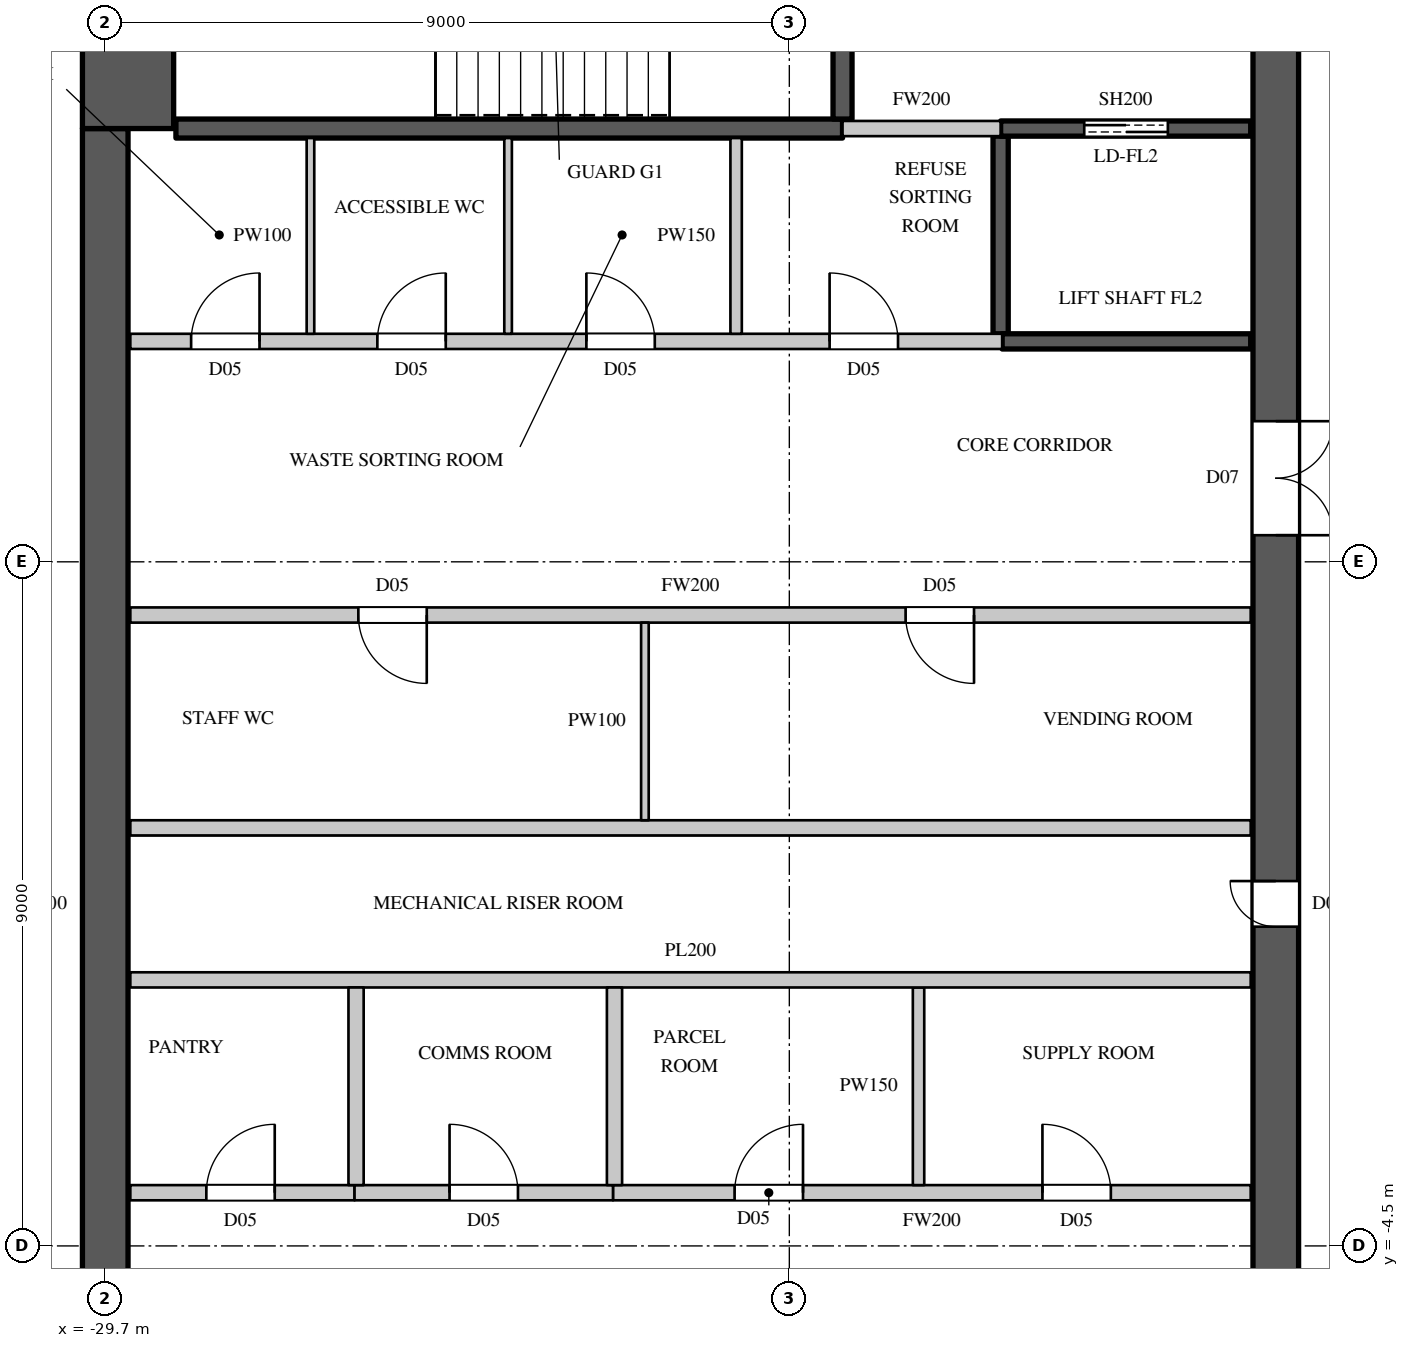
"""IFC4 building model, lengths in metres.
Left out: names, types, materials, properties, quantities, classifications, styles, units other than length and angle.
Written with IfcOpenShell. Run it as: python <this file> out.ifc"""

import sys

from ifc_helpers import new_model, si_unit, direction, frame, frame_2d, origin, place, context, subcontext, project, spatial, rectangle, extrude, element, fill, save


model = new_model("IFC4")
c1 = context("Model", 3, precision=1e-05, world=origin(), true_north=direction((0.0, 1.0)))
c2 = subcontext(c1, "Body", "Model", "MODEL_VIEW")
j1 = project(units=[si_unit("LENGTHUNIT", "METRE"), si_unit("PLANEANGLEUNIT", "RADIAN")], contexts=[c1])
p1 = place(None, origin())
s1 = spatial("IfcSite", under=j1, at=p1, CompositionType="ELEMENT")
p2 = place(p1, origin())
s2 = spatial("IfcBuilding", under=s1, at=p2, CompositionType="ELEMENT")
p3 = place(p2, frame((0.0, 0.0, 343.0)))
s3 = spatial("IfcBuildingStorey", under=s2, at=p3, CompositionType="ELEMENT", Elevation=343.0)
p4 = place(p3, frame((-14.3, -14.8, 0.0), z_axis=(0.0, 0.0, 1.0), x_axis=(0.0, 1.0, 0.0)))
e1 = element("IfcWall", 1, at=p4, inside=s3, PredefinedType="SHEAR", context=c2, shape_type="SweptSolid", body=[
    extrude(rectangle(XDim=29.6, YDim=0.6, at=frame_2d((14.8, 0.0))), origin(), (0.0, 0.0, 1.0), 4.0),
])
p5 = place(p4, frame((1.55, 0.0, 0.0)))
e2 = element("IfcOpeningElement", 2, at=p5, cuts=e1, PredefinedType="OPENING", context=c2, shape_type="SweptSolid", body=[
    extrude(rectangle(XDim=1.5, YDim=2.4, at=frame_2d((0.75, 1.2))), frame((0.0, 0.31, 0.0), z_axis=(0.0, -1.0, 0.0), x_axis=(1.0, 0.0, 0.0)), (0.0, 0.0, 1.0), 0.62),
])
p6 = place(p4, frame((26.55, 0.0, 0.0)))
e3 = element("IfcOpeningElement", 3, at=p6, cuts=e1, PredefinedType="OPENING", context=c2, shape_type="SweptSolid", body=[
    extrude(rectangle(XDim=1.5, YDim=2.4, at=frame_2d((0.75, 1.2))), frame((0.0, 0.31, 0.0), z_axis=(0.0, -1.0, 0.0), x_axis=(1.0, 0.0, 0.0)), (0.0, 0.0, 1.0), 0.62),
])
p7 = place(p4, frame((8.45, 0.0, 0.0)))
e4 = element("IfcOpeningElement", 4, at=p7, cuts=e1, PredefinedType="OPENING", context=c2, shape_type="SweptSolid", body=[
    extrude(rectangle(XDim=1.5, YDim=2.4, at=frame_2d((0.75, 1.2))), frame((0.0, 0.31, 0.0), z_axis=(0.0, -1.0, 0.0), x_axis=(1.0, 0.0, 0.0)), (0.0, 0.0, 1.0), 0.62),
])
p8 = place(p4, frame((19.65, 0.0, 0.0)))
e5 = element("IfcOpeningElement", 5, at=p8, cuts=e1, PredefinedType="OPENING", context=c2, shape_type="SweptSolid", body=[
    extrude(rectangle(XDim=1.5, YDim=2.4, at=frame_2d((0.75, 1.2))), frame((0.0, 0.31, 0.0), z_axis=(0.0, -1.0, 0.0), x_axis=(1.0, 0.0, 0.0)), (0.0, 0.0, 1.0), 0.62),
])
p9 = place(p4, frame((14.5, 0.0, 0.0)))
e6 = element("IfcOpeningElement", 6, at=p9, cuts=e1, PredefinedType="OPENING", context=c2, shape_type="SweptSolid", body=[
    extrude(rectangle(XDim=0.6, YDim=2.0, at=frame_2d((0.3, 1.0))), frame((0.0, 0.31, 0.0), z_axis=(0.0, -1.0, 0.0), x_axis=(1.0, 0.0, 0.0)), (0.0, 0.0, 1.0), 0.62),
])
p10 = place(p3, frame((-29.7, -10.2, 0.0), z_axis=(0.0, 0.0, 1.0), x_axis=(0.0, 1.0, 0.0)))
e7 = element("IfcWall", 7, at=p10, inside=s3, PredefinedType="SHEAR", context=c2, shape_type="SweptSolid", body=[
    extrude(rectangle(XDim=20.4, YDim=0.6, at=frame_2d((10.2, 0.0))), origin(), (0.0, 0.0, 1.0), 4.0),
])
p11 = place(p3, frame((-29.4, 10.2, 0.0), z_axis=(0.0, 0.0, 1.0), x_axis=(0.0, 1.0, 0.0)))
e8 = element("IfcWall", 8, at=p11, inside=s3, PredefinedType="SHEAR", context=c2, shape_type="SweptSolid", body=[
    extrude(rectangle(XDim=4.6, YDim=1.2, at=frame_2d((2.3, 0.0))), origin(), (0.0, 0.0, 1.0), 4.0),
])
p12 = place(p3, frame((-29.37, -3.8, 0.0), z_axis=(0.0, 0.0, 1.0), x_axis=(1.0, 0.0, 0.0)))
e9 = element("IfcWall", 9, at=p12, inside=s3, PredefinedType="PARTITIONING", context=c2, shape_type="SweptSolid", body=[
    extrude(rectangle(XDim=2.95, YDim=0.2, at=frame_2d((1.475, 0.0))), origin(), (0.0, 0.0, 1.0), 3.598),
])
p13 = place(p12, frame((1.0, 0.0, 0.0)))
e10 = element("IfcOpeningElement", 10, at=p13, cuts=e9, PredefinedType="OPENING", context=c2, shape_type="SweptSolid", body=[
    extrude(rectangle(XDim=0.9, YDim=2.2, at=frame_2d((0.45, 1.1))), frame((0.0, 0.11, 0.0), z_axis=(0.0, -1.0, 0.0), x_axis=(1.0, 0.0, 0.0)), (0.0, 0.0, 1.0), 0.22),
])
p14 = place(p3, frame((-29.37, 3.8, 0.0), z_axis=(0.0, 0.0, 1.0), x_axis=(1.0, 0.0, 0.0)))
e11 = element("IfcWall", 11, at=p14, inside=s3, PredefinedType="PARTITIONING", context=c2, shape_type="SweptSolid", body=[
    extrude(rectangle(XDim=14.74, YDim=0.2, at=frame_2d((7.37, 0.0))), origin(), (0.0, 0.0, 1.0), 3.598),
])
p15 = place(p14, frame((3.0, 0.0, 0.0)))
e12 = element("IfcOpeningElement", 12, at=p15, cuts=e11, PredefinedType="OPENING", context=c2, shape_type="SweptSolid", body=[
    extrude(rectangle(XDim=0.9, YDim=2.2, at=frame_2d((0.45, 1.1))), frame((0.0, 0.11, 0.0), z_axis=(0.0, -1.0, 0.0), x_axis=(1.0, 0.0, 0.0)), (0.0, 0.0, 1.0), 0.22),
])
p16 = place(p14, frame((10.2, 0.0, 0.0)))
e13 = element("IfcOpeningElement", 13, at=p16, cuts=e11, PredefinedType="OPENING", context=c2, shape_type="SweptSolid", body=[
    extrude(rectangle(XDim=0.9, YDim=2.2, at=frame_2d((0.45, 1.1))), frame((0.0, 0.11, 0.0), z_axis=(0.0, -1.0, 0.0), x_axis=(1.0, 0.0, 0.0)), (0.0, 0.0, 1.0), 0.22),
])
p17 = place(p3, frame((-29.37, 7.4, 0.0), z_axis=(0.0, 0.0, 1.0), x_axis=(1.0, 0.0, 0.0)))
e14 = element("IfcWall", 14, at=p17, inside=s3, PredefinedType="PARTITIONING", context=c2, shape_type="SweptSolid", body=[
    extrude(rectangle(XDim=11.47, YDim=0.2, at=frame_2d((5.735, 0.0))), origin(), (0.0, 0.0, 1.0), 3.598),
])
p18 = place(p17, frame((0.8, 0.0, 0.0)))
e15 = element("IfcOpeningElement", 15, at=p18, cuts=e14, PredefinedType="OPENING", context=c2, shape_type="SweptSolid", body=[
    extrude(rectangle(XDim=0.9, YDim=2.2, at=frame_2d((0.45, 1.1))), frame((0.0, 0.11, 0.0), z_axis=(0.0, -1.0, 0.0), x_axis=(1.0, 0.0, 0.0)), (0.0, 0.0, 1.0), 0.22),
])
p19 = place(p17, frame((3.25, 0.0, 0.0)))
e16 = element("IfcOpeningElement", 16, at=p19, cuts=e14, PredefinedType="OPENING", context=c2, shape_type="SweptSolid", body=[
    extrude(rectangle(XDim=0.9, YDim=2.2, at=frame_2d((0.45, 1.1))), frame((0.0, 0.11, 0.0), z_axis=(0.0, -1.0, 0.0), x_axis=(1.0, 0.0, 0.0)), (0.0, 0.0, 1.0), 0.22),
])
p20 = place(p17, frame((6.0, 0.0, 0.0)))
e17 = element("IfcOpeningElement", 17, at=p20, cuts=e14, PredefinedType="OPENING", context=c2, shape_type="SweptSolid", body=[
    extrude(rectangle(XDim=0.9, YDim=2.2, at=frame_2d((0.45, 1.1))), frame((0.0, 0.11, 0.0), z_axis=(0.0, -1.0, 0.0), x_axis=(1.0, 0.0, 0.0)), (0.0, 0.0, 1.0), 0.22),
])
p21 = place(p17, frame((9.2, 0.0, 0.0)))
e18 = element("IfcOpeningElement", 18, at=p21, cuts=e14, PredefinedType="OPENING", context=c2, shape_type="SweptSolid", body=[
    extrude(rectangle(XDim=0.9, YDim=2.2, at=frame_2d((0.45, 1.1))), frame((0.0, 0.11, 0.0), z_axis=(0.0, -1.0, 0.0), x_axis=(1.0, 0.0, 0.0)), (0.0, 0.0, 1.0), 0.22),
])
p22 = place(p3, frame((-23.02, -3.8, 0.0), z_axis=(0.0, 0.0, 1.0), x_axis=(1.0, 0.0, 0.0)))
e19 = element("IfcWall", 19, at=p22, inside=s3, PredefinedType="PARTITIONING", context=c2, shape_type="SweptSolid", body=[
    extrude(rectangle(XDim=8.39, YDim=0.2, at=frame_2d((4.195, 0.0))), origin(), (0.0, 0.0, 1.0), 3.598),
])
p23 = place(p22, frame((1.6, 0.0, 0.0)))
e20 = element("IfcOpeningElement", 20, at=p23, cuts=e19, PredefinedType="OPENING", context=c2, shape_type="SweptSolid", body=[
    extrude(rectangle(XDim=0.9, YDim=2.2, at=frame_2d((0.45, 1.1))), frame((0.0, 0.11, 0.0), z_axis=(0.0, -1.0, 0.0), x_axis=(1.0, 0.0, 0.0)), (0.0, 0.0, 1.0), 0.22),
])
p24 = place(p22, frame((5.65, 0.0, 0.0)))
e21 = element("IfcOpeningElement", 21, at=p24, cuts=e19, PredefinedType="OPENING", context=c2, shape_type="SweptSolid", body=[
    extrude(rectangle(XDim=0.9, YDim=2.2, at=frame_2d((0.45, 1.1))), frame((0.0, 0.11, 0.0), z_axis=(0.0, -1.0, 0.0), x_axis=(1.0, 0.0, 0.0)), (0.0, 0.0, 1.0), 0.22),
])
p25 = place(p3, frame((-20.0, 10.2, 0.0), z_axis=(0.0, 0.0, 1.0), x_axis=(1.0, 0.0, 0.0)))
e22 = element("IfcWall", 22, at=p25, inside=s3, PredefinedType="PARTITIONING", context=c2, shape_type="SweptSolid", body=[
    extrude(rectangle(XDim=2.08, YDim=0.2, at=frame_2d((1.04, 0.0))), origin(), (0.0, 0.0, 1.0), 3.598),
])
p26 = place(p3, frame((-21.4, 7.5, 0.0), z_axis=(0.0, 0.0, 1.0), x_axis=(0.0, 1.0, 0.0)))
e23 = element("IfcWall", 23, at=p26, inside=s3, PredefinedType="PARTITIONING", context=c2, shape_type="SweptSolid", body=[
    extrude(rectangle(XDim=2.575, YDim=0.15, at=frame_2d((1.288, 0.0))), origin(), (0.0, 0.0, 1.0), 3.598),
])
p27 = place(p3, frame((-19.0, -3.7, 0.0), z_axis=(0.0, 0.0, 1.0), x_axis=(0.0, 1.0, 0.0)))
e24 = element("IfcWall", 24, at=p27, inside=s3, PredefinedType="PARTITIONING", context=c2, shape_type="SweptSolid", body=[
    extrude(rectangle(XDim=2.6, YDim=0.15, at=frame_2d((1.3, 0.0))), origin(), (0.0, 0.0, 1.0), 3.598),
])
for number, where, z_axis, x_axis in (
    (25, (-29.37, -1.0, 0.0), (0.0, 0.0, 1.0), (1.0, 0.0, 0.0)),
    (26, (-29.37, 1.0, 0.0), (0.0, 0.0, 1.0), (1.0, 0.0, 0.0)),
):
    element("IfcWall", number, at=place(p3, frame(where, z_axis=z_axis, x_axis=x_axis)), inside=s3, PredefinedType="PARTITIONING", context=c2, shape_type="SweptSolid", body=[
        extrude(rectangle(XDim=14.74, YDim=0.2, at=frame_2d((7.37, 0.0))), origin(), (0.0, 0.0, 1.0), 3.598),
    ])
p28 = place(p3, frame((-26.42, -3.8, 0.0), z_axis=(0.0, 0.0, 1.0), x_axis=(1.0, 0.0, 0.0)))
e27 = element("IfcWall", 27, at=p28, inside=s3, PredefinedType="PARTITIONING", context=c2, shape_type="SweptSolid", body=[
    extrude(rectangle(XDim=3.4, YDim=0.2, at=frame_2d((1.7, 0.0))), origin(), (0.0, 0.0, 1.0), 3.598),
])
p29 = place(p28, frame((1.25, 0.0, 0.0)))
e28 = element("IfcOpeningElement", 28, at=p29, cuts=e27, PredefinedType="OPENING", context=c2, shape_type="SweptSolid", body=[
    extrude(rectangle(XDim=0.9, YDim=2.2, at=frame_2d((0.45, 1.1))), frame((0.0, 0.11, 0.0), z_axis=(0.0, -1.0, 0.0), x_axis=(1.0, 0.0, 0.0)), (0.0, 0.0, 1.0), 0.22),
])
for number, where, z_axis, x_axis in (
    (29, (-26.4, -3.7, 0.0), (0.0, 0.0, 1.0), (0.0, 1.0, 0.0)),
    (30, (-23.0, -3.7, 0.0), (0.0, 0.0, 1.0), (0.0, 1.0, 0.0)),
):
    element("IfcWall", number, at=place(p3, frame(where, z_axis=z_axis, x_axis=x_axis)), inside=s3, PredefinedType="PARTITIONING", context=c2, shape_type="SweptSolid", body=[
        extrude(rectangle(XDim=2.6, YDim=0.2, at=frame_2d((1.3, 0.0))), origin(), (0.0, 0.0, 1.0), 3.598),
    ])
p30 = place(p3, frame((-17.92, 7.5, 0.0), z_axis=(0.0, 0.0, 1.0), x_axis=(0.0, 1.0, 0.0)))
e31 = element("IfcWall", 31, at=p30, inside=s3, PredefinedType="SHEAR", context=c2, shape_type="SweptSolid", body=[
    extrude(rectangle(XDim=2.6, YDim=0.2, at=frame_2d((1.3, 0.0))), origin(), (0.0, 0.0, 1.0), 3.598),
])
p31 = place(p3, frame((-17.9, 7.4, 0.0), z_axis=(0.0, 0.0, 1.0), x_axis=(1.0, 0.0, 0.0)))
e32 = element("IfcWall", 32, at=p31, inside=s3, PredefinedType="SHEAR", context=c2, shape_type="SweptSolid", body=[
    extrude(rectangle(XDim=3.27, YDim=0.2, at=frame_2d((1.635, 0.0))), origin(), (0.0, 0.0, 1.0), 3.598),
])
p32 = place(p3, frame((-17.92, 10.2, 0.0), z_axis=(0.0, 0.0, 1.0), x_axis=(1.0, 0.0, 0.0)))
e33 = element("IfcWall", 33, at=p32, inside=s3, PredefinedType="SHEAR", context=c2, shape_type="SweptSolid", body=[
    extrude(rectangle(XDim=3.29, YDim=0.2, at=frame_2d((1.645, 0.0))), origin(), (0.0, 0.0, 1.0), 3.598),
])
p33 = place(p32, frame((1.1, 0.0, 0.0)))
e34 = element("IfcOpeningElement", 34, at=p33, cuts=e33, PredefinedType="OPENING", context=c2, shape_type="SweptSolid", body=[
    extrude(rectangle(XDim=1.1, YDim=2.2, at=frame_2d((0.55, 1.1))), frame((0.0, 0.11, 0.0), z_axis=(0.0, -1.0, 0.0), x_axis=(1.0, 0.0, 0.0)), (0.0, 0.0, 1.0), 0.22),
])
p34 = place(p3, frame((-28.77, 10.2, 0.0), z_axis=(0.0, 0.0, 1.0), x_axis=(1.0, 0.0, 0.0)))
e35 = element("IfcWall", 35, at=p34, inside=s3, PredefinedType="SHEAR", context=c2, shape_type="SweptSolid", body=[
    extrude(rectangle(XDim=8.77, YDim=0.25, at=frame_2d((4.385, 0.0))), origin(), (0.0, 0.0, 1.0), 3.598),
])
p35 = place(p3, frame((-20.0, 10.325, 0.0), z_axis=(0.0, 0.0, 1.0), x_axis=(0.0, 1.0, 0.0)))
e36 = element("IfcWall", 36, at=p35, inside=s3, PredefinedType="SHEAR", context=c2, shape_type="SweptSolid", body=[
    extrude(rectangle(XDim=4.445, YDim=0.25, at=frame_2d((2.223, 0.0))), origin(), (0.0, 0.0, 1.0), 3.598),
])
p36 = place(p35, frame((1.65, 0.0, 0.0)))
e37 = element("IfcOpeningElement", 37, at=p36, cuts=e36, PredefinedType="OPENING", context=c2, shape_type="SweptSolid", body=[
    extrude(rectangle(XDim=1.1, YDim=2.2, at=frame_2d((0.55, 1.1))), frame((0.0, 0.135, 0.0), z_axis=(0.0, -1.0, 0.0), x_axis=(1.0, 0.0, 0.0)), (0.0, 0.0, 1.0), 0.27),
])
for number, where, z_axis, x_axis in (
    (38, (-27.0, 7.5, 0.0), (0.0, 0.0, 1.0), (0.0, 1.0, 0.0)),
    (39, (-24.4, 7.5, 0.0), (0.0, 0.0, 1.0), (0.0, 1.0, 0.0)),
):
    element("IfcWall", number, at=place(p3, frame(where, z_axis=z_axis, x_axis=x_axis)), inside=s3, PredefinedType="PARTITIONING", context=c2, shape_type="SweptSolid", body=[
        extrude(rectangle(XDim=2.575, YDim=0.1, at=frame_2d((1.288, 0.0))), origin(), (0.0, 0.0, 1.0), 3.598),
    ])
p37 = place(p3, frame((-22.6, 1.1, 0.0), z_axis=(0.0, 0.0, 1.0), x_axis=(0.0, 1.0, 0.0)))
e40 = element("IfcWall", 40, at=p37, inside=s3, PredefinedType="PARTITIONING", context=c2, shape_type="SweptSolid", body=[
    extrude(rectangle(XDim=2.6, YDim=0.1, at=frame_2d((1.3, 0.0))), origin(), (0.0, 0.0, 1.0), 3.598),
])
p38 = place(p13, origin())
e41 = element("IfcDoor", 41, at=p38, inside=s3, OperationType="SINGLE_SWING_RIGHT", PredefinedType="DOOR", context=c2, shape_type="SweptSolid", body=[
    extrude(rectangle(XDim=0.9, YDim=2.2, at=frame_2d((0.45, 1.1))), frame((0.0, 0.025, 0.0), z_axis=(0.0, -1.0, 0.0), x_axis=(1.0, 0.0, 0.0)), (0.0, 0.0, 1.0), 0.05),
])
fill(e10, e41)
p39 = place(p29, origin())
e42 = element("IfcDoor", 42, at=p39, inside=s3, OperationType="SINGLE_SWING_LEFT", PredefinedType="DOOR", context=c2, shape_type="SweptSolid", body=[
    extrude(rectangle(XDim=0.9, YDim=2.2, at=frame_2d((0.45, 1.1))), frame((0.0, 0.025, 0.0), z_axis=(0.0, -1.0, 0.0), x_axis=(1.0, 0.0, 0.0)), (0.0, 0.0, 1.0), 0.05),
])
fill(e28, e42)
p40 = place(p23, origin())
e43 = element("IfcDoor", 43, at=p40, inside=s3, OperationType="SINGLE_SWING_RIGHT", PredefinedType="DOOR", context=c2, shape_type="SweptSolid", body=[
    extrude(rectangle(XDim=0.9, YDim=2.2, at=frame_2d((0.45, 1.1))), frame((0.0, 0.025, 0.0), z_axis=(0.0, -1.0, 0.0), x_axis=(1.0, 0.0, 0.0)), (0.0, 0.0, 1.0), 0.05),
])
fill(e20, e43)
p41 = place(p24, origin())
e44 = element("IfcDoor", 44, at=p41, inside=s3, OperationType="SINGLE_SWING_LEFT", PredefinedType="DOOR", context=c2, shape_type="SweptSolid", body=[
    extrude(rectangle(XDim=0.9, YDim=2.2, at=frame_2d((0.45, 1.1))), frame((0.0, 0.025, 0.0), z_axis=(0.0, -1.0, 0.0), x_axis=(1.0, 0.0, 0.0)), (0.0, 0.0, 1.0), 0.05),
])
fill(e21, e44)
p42 = place(p15, origin())
e45 = element("IfcDoor", 45, at=p42, inside=s3, OperationType="SINGLE_SWING_LEFT", PredefinedType="DOOR", context=c2, shape_type="SweptSolid", body=[
    extrude(rectangle(XDim=0.9, YDim=2.2, at=frame_2d((0.45, 1.1))), frame((0.0, 0.025, 0.0), z_axis=(0.0, -1.0, 0.0), x_axis=(1.0, 0.0, 0.0)), (0.0, 0.0, 1.0), 0.05),
])
fill(e12, e45)
p43 = place(p16, origin())
e46 = element("IfcDoor", 46, at=p43, inside=s3, OperationType="SINGLE_SWING_LEFT", PredefinedType="DOOR", context=c2, shape_type="SweptSolid", body=[
    extrude(rectangle(XDim=0.9, YDim=2.2, at=frame_2d((0.45, 1.1))), frame((0.0, 0.025, 0.0), z_axis=(0.0, -1.0, 0.0), x_axis=(1.0, 0.0, 0.0)), (0.0, 0.0, 1.0), 0.05),
])
fill(e13, e46)
p44 = place(p18, origin())
e47 = element("IfcDoor", 47, at=p44, inside=s3, OperationType="SINGLE_SWING_RIGHT", PredefinedType="DOOR", context=c2, shape_type="SweptSolid", body=[
    extrude(rectangle(XDim=0.9, YDim=2.2, at=frame_2d((0.45, 1.1))), frame((0.0, 0.025, 0.0), z_axis=(0.0, -1.0, 0.0), x_axis=(1.0, 0.0, 0.0)), (0.0, 0.0, 1.0), 0.05),
])
fill(e15, e47)
p45 = place(p19, origin())
e48 = element("IfcDoor", 48, at=p45, inside=s3, OperationType="SINGLE_SWING_RIGHT", PredefinedType="DOOR", context=c2, shape_type="SweptSolid", body=[
    extrude(rectangle(XDim=0.9, YDim=2.2, at=frame_2d((0.45, 1.1))), frame((0.0, 0.025, 0.0), z_axis=(0.0, -1.0, 0.0), x_axis=(1.0, 0.0, 0.0)), (0.0, 0.0, 1.0), 0.05),
])
fill(e16, e48)
p46 = place(p20, origin())
e49 = element("IfcDoor", 49, at=p46, inside=s3, OperationType="SINGLE_SWING_LEFT", PredefinedType="DOOR", context=c2, shape_type="SweptSolid", body=[
    extrude(rectangle(XDim=0.9, YDim=2.2, at=frame_2d((0.45, 1.1))), frame((0.0, 0.025, 0.0), z_axis=(0.0, -1.0, 0.0), x_axis=(1.0, 0.0, 0.0)), (0.0, 0.0, 1.0), 0.05),
])
fill(e17, e49)
p47 = place(p21, origin())
e50 = element("IfcDoor", 50, at=p47, inside=s3, OperationType="SINGLE_SWING_LEFT", PredefinedType="DOOR", context=c2, shape_type="SweptSolid", body=[
    extrude(rectangle(XDim=0.9, YDim=2.2, at=frame_2d((0.45, 1.1))), frame((0.0, 0.025, 0.0), z_axis=(0.0, -1.0, 0.0), x_axis=(1.0, 0.0, 0.0)), (0.0, 0.0, 1.0), 0.05),
])
fill(e18, e50)
p48 = place(p33, origin())
e51 = element("IfcDoor", 51, at=p48, inside=s3, OperationType="DOUBLE_DOOR_SLIDING", PredefinedType="DOOR", context=c2, shape_type="SweptSolid", body=[
    extrude(rectangle(XDim=1.1, YDim=2.2, at=frame_2d((0.55, 1.1))), frame((0.0, 0.025, 0.0), z_axis=(0.0, -1.0, 0.0), x_axis=(1.0, 0.0, 0.0)), (0.0, 0.0, 1.0), 0.05),
])
fill(e34, e51)
p49 = place(p8, origin())
e52 = element("IfcDoor", 52, at=p49, inside=s3, OperationType="DOUBLE_DOOR_SINGLE_SWING", PredefinedType="DOOR", context=c2, shape_type="SweptSolid", body=[
    extrude(rectangle(XDim=1.5, YDim=2.4, at=frame_2d((0.75, 1.2))), frame((0.0, -0.245, 0.0), z_axis=(0.0, -1.0, 0.0), x_axis=(1.0, 0.0, 0.0)), (0.0, 0.0, 1.0), 0.05),
])
fill(e5, e52)
p50 = place(p9, origin())
e53 = element("IfcDoor", 53, at=p50, inside=s3, OperationType="SINGLE_SWING_RIGHT", PredefinedType="DOOR", context=c2, shape_type="SweptSolid", body=[
    extrude(rectangle(XDim=0.6, YDim=2.0, at=frame_2d((0.3, 1.0))), frame((0.0, 0.295, 0.0), z_axis=(0.0, -1.0, 0.0), x_axis=(1.0, 0.0, 0.0)), (0.0, 0.0, 1.0), 0.05),
])
fill(e6, e53)
save(model, sys.argv[1])
